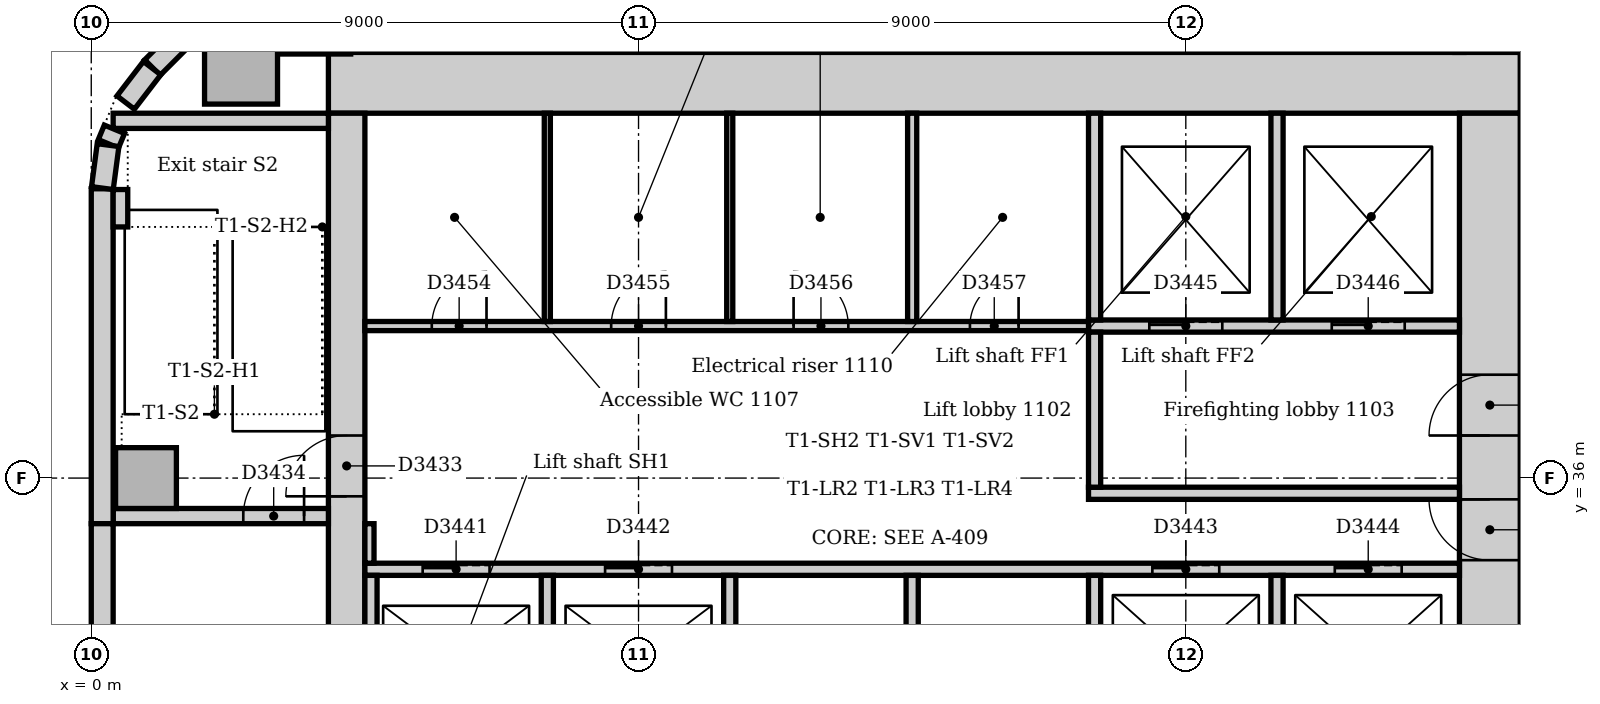
"""IFC4 building model, lengths in metres.
Left out: names, types, materials, properties, quantities, classifications, styles, units other than length and angle.
Written with IfcOpenShell. Run it as: python <this file> out.ifc"""

import sys

from ifc_helpers import new_model, si_unit, direction, frame, frame_2d, origin, origin_2d, place, context, subcontext, project, spatial, rectangle, extrude, element, fill, save


model = new_model("IFC4")
c1 = context("Model", 3, precision=1e-05, world=origin(), true_north=direction((0.0, 1.0)))
c2 = subcontext(c1, "Body", "Model", "MODEL_VIEW")
j1 = project(units=[si_unit("LENGTHUNIT", "METRE"), si_unit("PLANEANGLEUNIT", "RADIAN")], contexts=[c1])
p1 = place(None, origin())
s1 = spatial("IfcSite", under=j1, at=p1, CompositionType="ELEMENT")
p2 = place(p1, origin())
s2 = spatial("IfcBuilding", under=s1, at=p2, CompositionType="ELEMENT")
p3 = place(p2, frame((0.0, 0.0, 51.0)))
s3 = spatial("IfcBuildingStorey", under=s2, at=p3, CompositionType="ELEMENT", Elevation=51.0)
p4 = place(p3, frame((23.5, 42.5, 0.0), z_axis=(0.0, 0.0, 1.0), x_axis=(-1.0, 0.0, 0.0)))
e1 = element("IfcWall", 1, at=p4, inside=s3, PredefinedType="SOLIDWALL", context=c2, shape_type="SweptSolid", body=[
    extrude(rectangle(XDim=19.6, YDim=1.0, at=frame_2d((9.8, 0.0))), origin(), (0.0, 0.0, 1.0), 4.0),
])
p5 = place(p3, frame((23.0, 31.5, 0.0), z_axis=(0.0, 0.0, 1.0), x_axis=(0.0, 1.0, 0.0)))
e2 = element("IfcWall", 2, at=p5, inside=s3, PredefinedType="SOLIDWALL", context=c2, shape_type="SweptSolid", body=[
    extrude(rectangle(XDim=10.5, YDim=1.0, at=frame_2d((5.25, 0.0))), origin(), (0.0, 0.0, 1.0), 4.0),
])
p6 = place(p5, frame((3.15, 0.0, 0.0)))
e3 = element("IfcOpeningElement", 3, at=p6, cuts=e2, PredefinedType="OPENING", context=c2, shape_type="SweptSolid", body=[
    extrude(rectangle(XDim=1.0, YDim=2.1, at=frame_2d((0.5, 1.05))), frame((0.0, 0.51, 0.0), z_axis=(0.0, -1.0, 0.0), x_axis=(1.0, 0.0, 0.0)), (0.0, 0.0, 1.0), 1.02),
])
p7 = place(p5, frame((5.2, 0.0, 0.0)))
e4 = element("IfcOpeningElement", 4, at=p7, cuts=e2, PredefinedType="OPENING", context=c2, shape_type="SweptSolid", body=[
    extrude(rectangle(XDim=1.0, YDim=2.1, at=frame_2d((0.5, 1.05))), frame((0.0, 0.51, 0.0), z_axis=(0.0, -1.0, 0.0), x_axis=(1.0, 0.0, 0.0)), (0.0, 0.0, 1.0), 1.02),
])
p8 = place(p3, frame((4.2, 42.0, 0.0), z_axis=(0.0, 0.0, 1.0), x_axis=(0.0, -1.0, 0.0)))
e5 = element("IfcWall", 5, at=p8, inside=s3, PredefinedType="SOLIDWALL", context=c2, shape_type="SweptSolid", body=[
    extrude(rectangle(XDim=10.5, YDim=0.6, at=frame_2d((5.25, 0.0))), origin(), (0.0, 0.0, 1.0), 4.0),
])
p9 = place(p8, frame((5.3, 0.0, 0.0)))
e6 = element("IfcOpeningElement", 6, at=p9, cuts=e5, PredefinedType="OPENING", context=c2, shape_type="SweptSolid", body=[
    extrude(rectangle(XDim=1.0, YDim=2.1, at=frame_2d((0.5, 1.05))), frame((0.0, 0.31, 0.0), z_axis=(0.0, -1.0, 0.0), x_axis=(1.0, 0.0, 0.0)), (0.0, 0.0, 1.0), 0.62),
])
p10 = place(p3, frame((0.36, 35.375, 0.0), z_axis=(0.0, 0.0, 1.0), x_axis=(1.0, 0.0, 0.0)))
e7 = element("IfcWall", 7, at=p10, inside=s3, PredefinedType="SOLIDWALL", context=c2, shape_type="SweptSolid", body=[
    extrude(rectangle(XDim=3.54, YDim=0.25, at=frame_2d((1.77, 0.0))), origin(), (0.0, 0.0, 1.0), 4.0),
])
p11 = place(p10, frame((2.14, 0.0, 0.0)))
e8 = element("IfcOpeningElement", 8, at=p11, cuts=e7, PredefinedType="OPENING", context=c2, shape_type="SweptSolid", body=[
    extrude(rectangle(XDim=1.0, YDim=2.1, at=frame_2d((0.5, 1.05))), frame((0.0, 0.135, 0.0), z_axis=(0.0, -1.0, 0.0), x_axis=(1.0, 0.0, 0.0)), (0.0, 0.0, 1.0), 0.27),
])
p12 = place(p3, frame((3.9, 41.875, 0.0), z_axis=(0.0, 0.0, 1.0), x_axis=(-1.0, 0.0, 0.0)))
e9 = element("IfcWall", 9, at=p12, inside=s3, PredefinedType="SOLIDWALL", context=c2, shape_type="SweptSolid", body=[
    extrude(rectangle(XDim=3.54, YDim=0.25, at=frame_2d((1.77, 0.0))), origin(), (0.0, 0.0, 1.0), 4.0),
])
for number, where, z_axis, x_axis in (
    (10, (3.667, 43.574, 0.0), (0.0, 0.0, 1.0), (1.0, 0.0, 0.0)),
    (11, (2.463, 42.75, 0.0), (0.0, 0.0, 1.0), (1.0, 0.0, 0.0)),
):
    element("IfcColumn", number, at=place(p3, frame(where, z_axis=z_axis, x_axis=x_axis)), inside=s3, PredefinedType="COLUMN", context=c2, shape_type="SweptSolid", body=[
        extrude(rectangle(XDim=1.2, YDim=1.2, at=origin_2d()), origin(), (0.0, 0.0, 1.0), 3.85),
    ])
p13 = place(p3, frame((0.9, 36.0, 0.0), z_axis=(0.0, 0.0, 1.0), x_axis=(1.0, 0.0, 0.0)))
e12 = element("IfcColumn", 12, at=p13, inside=s3, PredefinedType="COLUMN", context=c2, shape_type="SweptSolid", body=[
    extrude(rectangle(XDim=1.0, YDim=1.0, at=origin_2d()), origin(), (0.0, 0.0, 1.0), 4.0),
])
p14 = place(p3, frame((2.249, 43.994, 0.0), z_axis=(0.0, 0.0, 1.0), x_axis=(-0.707106781187, -0.707106781187, 0.0)))
e13 = element("IfcWall", 13, at=p14, inside=s3, PredefinedType="STANDARD", context=c2, shape_type="SweptSolid", body=[
    extrude(rectangle(XDim=1.757, YDim=0.36, at=frame_2d((0.879, 0.0))), origin(), (0.0, 0.0, 1.0), 3.85),
])
p15 = place(p3, frame((0.18, 40.757, 0.0), z_axis=(0.0, 0.0, 1.0), x_axis=(0.0, -1.0, 0.0)))
e14 = element("IfcWall", 14, at=p15, inside=s3, PredefinedType="STANDARD", context=c2, shape_type="SweptSolid", body=[
    extrude(rectangle(XDim=5.507, YDim=0.36, at=frame_2d((2.754, 0.0))), origin(), (0.0, 0.0, 1.0), 3.85),
])
p16 = place(p3, frame((0.18, 35.25, 0.0), z_axis=(0.0, 0.0, 1.0), x_axis=(0.0, -1.0, 0.0)))
e15 = element("IfcWall", 15, at=p16, inside=s3, PredefinedType="STANDARD", context=c2, shape_type="SweptSolid", body=[
    extrude(rectangle(XDim=7.5, YDim=0.36, at=frame_2d((3.75, 0.0))), origin(), (0.0, 0.0, 1.0), 3.85),
])
p17 = place(p3, frame((1.0, 42.741, 0.0), z_axis=(0.0, 0.0, 1.0), x_axis=(-0.608802368033, -0.793321924995, 0.0)))
e16 = element("IfcWall", 16, at=p17, inside=s3, PredefinedType="STANDARD", context=c2, shape_type="SweptSolid", body=[
    extrude(rectangle(XDim=0.713, YDim=0.36, at=frame_2d((0.357, 0.0))), origin(), (0.0, 0.0, 1.0), 3.85),
])
p18 = place(p3, frame((0.381, 41.736, 0.0), z_axis=(0.0, 0.0, 1.0), x_axis=(-0.382773360986, -0.923842277729, 0.0)))
e17 = element("IfcWall", 17, at=p18, inside=s3, PredefinedType="STANDARD", context=c2, shape_type="SweptSolid", body=[
    extrude(rectangle(XDim=0.258, YDim=0.36, at=frame_2d((0.129, 0.0))), origin(), (0.0, 0.0, 1.0), 3.85),
])
p19 = place(p3, frame((0.276, 41.476, 0.0), z_axis=(0.0, 0.0, 1.0), x_axis=(-0.13055608231, -0.99144092581, 0.0)))
e18 = element("IfcWall", 18, at=p19, inside=s3, PredefinedType="STANDARD", context=c2, shape_type="SweptSolid", body=[
    extrude(rectangle(XDim=0.713, YDim=0.36, at=frame_2d((0.356, 0.0))), origin(), (0.0, 0.0, 1.0), 3.85),
])
p20 = place(p3, frame((0.48, 40.13, 0.0), z_axis=(0.0, 0.0, 1.0), x_axis=(0.0, 1.0, 0.0)))
e19 = element("IfcWall", 19, at=p20, inside=s3, PredefinedType="STANDARD", context=c2, shape_type="SweptSolid", body=[
    extrude(rectangle(XDim=0.615, YDim=0.24, at=frame_2d((0.307, 0.0))), origin(), (0.0, 0.0, 1.0), 4.0),
])
p21 = place(p3, frame((16.4, 35.75, 0.0), z_axis=(0.0, 0.0, 1.0), x_axis=(1.0, 0.0, 0.0)))
e20 = element("IfcWall", 20, at=p21, inside=s3, PredefinedType="PARTITIONING", context=c2, shape_type="SweptSolid", body=[
    extrude(rectangle(XDim=6.1, YDim=0.2, at=frame_2d((3.05, 0.0))), origin(), (0.0, 0.0, 1.0), 3.85),
])
p22 = place(p3, frame((16.4, 38.5, 0.0), z_axis=(0.0, 0.0, 1.0), x_axis=(1.0, 0.0, 0.0)))
e21 = element("IfcWall", 21, at=p22, inside=s3, PredefinedType="PARTITIONING", context=c2, shape_type="SweptSolid", body=[
    extrude(rectangle(XDim=6.1, YDim=0.2, at=frame_2d((3.05, 0.0))), origin(), (0.0, 0.0, 1.0), 3.85),
])
p23 = place(p22, frame((1.0, 0.0, 0.0)))
e22 = element("IfcOpeningElement", 22, at=p23, cuts=e21, PredefinedType="OPENING", context=c2, shape_type="SweptSolid", body=[
    extrude(rectangle(XDim=1.2, YDim=2.1, at=frame_2d((0.6, 1.05))), frame((0.0, 0.11, 0.0), z_axis=(0.0, -1.0, 0.0), x_axis=(1.0, 0.0, 0.0)), (0.0, 0.0, 1.0), 0.22),
])
p24 = place(p22, frame((4.0, 0.0, 0.0)))
e23 = element("IfcOpeningElement", 23, at=p24, cuts=e21, PredefinedType="OPENING", context=c2, shape_type="SweptSolid", body=[
    extrude(rectangle(XDim=1.2, YDim=2.1, at=frame_2d((0.6, 1.05))), frame((0.0, 0.11, 0.0), z_axis=(0.0, -1.0, 0.0), x_axis=(1.0, 0.0, 0.0)), (0.0, 0.0, 1.0), 0.22),
])
p25 = place(p3, frame((16.5, 35.85, 0.0), z_axis=(0.0, 0.0, 1.0), x_axis=(0.0, 1.0, 0.0)))
e24 = element("IfcWall", 24, at=p25, inside=s3, PredefinedType="PARTITIONING", context=c2, shape_type="SweptSolid", body=[
    extrude(rectangle(XDim=2.55, YDim=0.2, at=frame_2d((1.275, 0.0))), origin(), (0.0, 0.0, 1.0), 3.85),
])
p26 = place(p3, frame((4.5, 34.5, 0.0), z_axis=(0.0, 0.0, 1.0), x_axis=(1.0, 0.0, 0.0)))
e25 = element("IfcWall", 25, at=p26, inside=s3, PredefinedType="PARTITIONING", context=c2, shape_type="SweptSolid", body=[
    extrude(rectangle(XDim=18.0, YDim=0.2, at=frame_2d((9.0, 0.0))), origin(), (0.0, 0.0, 1.0), 3.85),
])
p27 = place(p26, frame((0.95, 0.0, 0.0)))
e26 = element("IfcOpeningElement", 26, at=p27, cuts=e25, PredefinedType="OPENING", context=c2, shape_type="SweptSolid", body=[
    extrude(rectangle(XDim=1.1, YDim=2.1, at=frame_2d((0.55, 1.05))), frame((0.0, 0.11, 0.0), z_axis=(0.0, -1.0, 0.0), x_axis=(1.0, 0.0, 0.0)), (0.0, 0.0, 1.0), 0.22),
])
p28 = place(p26, frame((3.95, 0.0, 0.0)))
e27 = element("IfcOpeningElement", 27, at=p28, cuts=e25, PredefinedType="OPENING", context=c2, shape_type="SweptSolid", body=[
    extrude(rectangle(XDim=1.1, YDim=2.1, at=frame_2d((0.55, 1.05))), frame((0.0, 0.11, 0.0), z_axis=(0.0, -1.0, 0.0), x_axis=(1.0, 0.0, 0.0)), (0.0, 0.0, 1.0), 0.22),
])
p29 = place(p26, frame((12.95, 0.0, 0.0)))
e28 = element("IfcOpeningElement", 28, at=p29, cuts=e25, PredefinedType="OPENING", context=c2, shape_type="SweptSolid", body=[
    extrude(rectangle(XDim=1.1, YDim=2.1, at=frame_2d((0.55, 1.05))), frame((0.0, 0.11, 0.0), z_axis=(0.0, -1.0, 0.0), x_axis=(1.0, 0.0, 0.0)), (0.0, 0.0, 1.0), 0.22),
])
p30 = place(p26, frame((15.95, 0.0, 0.0)))
e29 = element("IfcOpeningElement", 29, at=p30, cuts=e25, PredefinedType="OPENING", context=c2, shape_type="SweptSolid", body=[
    extrude(rectangle(XDim=1.1, YDim=2.1, at=frame_2d((0.55, 1.05))), frame((0.0, 0.11, 0.0), z_axis=(0.0, -1.0, 0.0), x_axis=(1.0, 0.0, 0.0)), (0.0, 0.0, 1.0), 0.22),
])
for number, where, z_axis, x_axis in (
    (30, (16.5, 38.6, 0.0), (0.0, 0.0, 1.0), (0.0, 1.0, 0.0)),
    (31, (19.5, 38.6, 0.0), (0.0, 0.0, 1.0), (0.0, 1.0, 0.0)),
):
    element("IfcWall", number, at=place(p3, frame(where, z_axis=z_axis, x_axis=x_axis)), inside=s3, PredefinedType="PARTITIONING", context=c2, shape_type="SweptSolid", body=[
        extrude(rectangle(XDim=3.4, YDim=0.2, at=frame_2d((1.7, 0.0))), origin(), (0.0, 0.0, 1.0), 3.85),
    ])
for number, where, z_axis, x_axis in (
    (32, (4.6, 31.75, 0.0), (0.0, 0.0, 1.0), (0.0, 1.0, 0.0)),
    (33, (7.5, 31.75, 0.0), (0.0, 0.0, 1.0), (0.0, 1.0, 0.0)),
    (34, (10.5, 31.75, 0.0), (0.0, 0.0, 1.0), (0.0, 1.0, 0.0)),
    (35, (13.5, 31.75, 0.0), (0.0, 0.0, 1.0), (0.0, 1.0, 0.0)),
    (36, (16.5, 31.75, 0.0), (0.0, 0.0, 1.0), (0.0, 1.0, 0.0)),
    (37, (19.5, 31.75, 0.0), (0.0, 0.0, 1.0), (0.0, 1.0, 0.0)),
):
    element("IfcWall", number, at=place(p3, frame(where, z_axis=z_axis, x_axis=x_axis)), inside=s3, PredefinedType="PARTITIONING", context=c2, shape_type="SweptSolid", body=[
        extrude(rectangle(XDim=2.65, YDim=0.2, at=frame_2d((1.325, 0.0))), origin(), (0.0, 0.0, 1.0), 3.85),
    ])
p31 = place(p3, frame((4.5, 38.5, 0.0), z_axis=(0.0, 0.0, 1.0), x_axis=(1.0, 0.0, 0.0)))
e38 = element("IfcWall", 38, at=p31, inside=s3, PredefinedType="PARTITIONING", context=c2, shape_type="SweptSolid", body=[
    extrude(rectangle(XDim=11.9, YDim=0.15, at=frame_2d((5.95, 0.0))), origin(), (0.0, 0.0, 1.0), 3.85),
])
p32 = place(p31, frame((1.1, 0.0, 0.0)))
e39 = element("IfcOpeningElement", 39, at=p32, cuts=e38, PredefinedType="OPENING", context=c2, shape_type="SweptSolid", body=[
    extrude(rectangle(XDim=0.9, YDim=2.1, at=frame_2d((0.45, 1.05))), frame((0.0, 0.085, 0.0), z_axis=(0.0, -1.0, 0.0), x_axis=(1.0, 0.0, 0.0)), (0.0, 0.0, 1.0), 0.17),
])
p33 = place(p31, frame((4.05, 0.0, 0.0)))
e40 = element("IfcOpeningElement", 40, at=p33, cuts=e38, PredefinedType="OPENING", context=c2, shape_type="SweptSolid", body=[
    extrude(rectangle(XDim=0.9, YDim=2.1, at=frame_2d((0.45, 1.05))), frame((0.0, 0.085, 0.0), z_axis=(0.0, -1.0, 0.0), x_axis=(1.0, 0.0, 0.0)), (0.0, 0.0, 1.0), 0.17),
])
p34 = place(p31, frame((7.05, 0.0, 0.0)))
e41 = element("IfcOpeningElement", 41, at=p34, cuts=e38, PredefinedType="OPENING", context=c2, shape_type="SweptSolid", body=[
    extrude(rectangle(XDim=0.9, YDim=2.1, at=frame_2d((0.45, 1.05))), frame((0.0, 0.085, 0.0), z_axis=(0.0, -1.0, 0.0), x_axis=(1.0, 0.0, 0.0)), (0.0, 0.0, 1.0), 0.17),
])
p35 = place(p31, frame((9.95, 0.0, 0.0)))
e42 = element("IfcOpeningElement", 42, at=p35, cuts=e38, PredefinedType="OPENING", context=c2, shape_type="SweptSolid", body=[
    extrude(rectangle(XDim=0.8, YDim=2.1, at=frame_2d((0.4, 1.05))), frame((0.0, 0.085, 0.0), z_axis=(0.0, -1.0, 0.0), x_axis=(1.0, 0.0, 0.0)), (0.0, 0.0, 1.0), 0.17),
])
p36 = place(p3, frame((4.575, 34.6, 0.0), z_axis=(0.0, 0.0, 1.0), x_axis=(0.0, 1.0, 0.0)))
e43 = element("IfcWall", 43, at=p36, inside=s3, PredefinedType="PARTITIONING", context=c2, shape_type="SweptSolid", body=[
    extrude(rectangle(XDim=0.65, YDim=0.15, at=frame_2d((0.325, 0.0))), origin(), (0.0, 0.0, 1.0), 3.85),
])
p37 = place(p3, frame((13.5, 38.575, 0.0), z_axis=(0.0, 0.0, 1.0), x_axis=(0.0, 1.0, 0.0)))
e44 = element("IfcWall", 44, at=p37, inside=s3, PredefinedType="PARTITIONING", context=c2, shape_type="SweptSolid", body=[
    extrude(rectangle(XDim=3.425, YDim=0.15, at=frame_2d((1.712, 0.0))), origin(), (0.0, 0.0, 1.0), 3.85),
])
for number, where, z_axis, x_axis in (
    (45, (7.5, 38.575, 0.0), (0.0, 0.0, 1.0), (0.0, 1.0, 0.0)),
    (46, (10.5, 38.575, 0.0), (0.0, 0.0, 1.0), (0.0, 1.0, 0.0)),
):
    element("IfcWall", number, at=place(p3, frame(where, z_axis=z_axis, x_axis=x_axis)), inside=s3, PredefinedType="PARTITIONING", context=c2, shape_type="SweptSolid", body=[
        extrude(rectangle(XDim=3.425, YDim=0.1, at=frame_2d((1.712, 0.0))), origin(), (0.0, 0.0, 1.0), 3.85),
    ])
p38 = place(p9, frame((1.0, 0.0, 0.0), z_axis=(0.0, 0.0, 1.0), x_axis=(-1.0, 0.0, 0.0)))
e47 = element("IfcDoor", 47, at=p38, inside=s3, OperationType="SINGLE_SWING_LEFT", PredefinedType="DOOR", context=c2, shape_type="SweptSolid", body=[
    extrude(rectangle(XDim=1.0, YDim=2.1, at=frame_2d((0.5, 1.05))), frame((0.0, 0.025, 0.0), z_axis=(0.0, -1.0, 0.0), x_axis=(1.0, 0.0, 0.0)), (0.0, 0.0, 1.0), 0.05),
])
fill(e6, e47)
p39 = place(p11, origin())
e48 = element("IfcDoor", 48, at=p39, inside=s3, OperationType="SINGLE_SWING_RIGHT", PredefinedType="DOOR", context=c2, shape_type="SweptSolid", body=[
    extrude(rectangle(XDim=1.0, YDim=2.1, at=frame_2d((0.5, 1.05))), frame((0.0, 0.025, 0.0), z_axis=(0.0, -1.0, 0.0), x_axis=(1.0, 0.0, 0.0)), (0.0, 0.0, 1.0), 0.05),
])
fill(e8, e48)
p40 = place(p27, origin())
e49 = element("IfcDoor", 49, at=p40, inside=s3, OperationType="SLIDING_TO_LEFT", PredefinedType="DOOR", context=c2, shape_type="SweptSolid", body=[
    extrude(rectangle(XDim=1.1, YDim=2.1, at=frame_2d((0.55, 1.05))), frame((0.0, 0.025, 0.0), z_axis=(0.0, -1.0, 0.0), x_axis=(1.0, 0.0, 0.0)), (0.0, 0.0, 1.0), 0.05),
])
fill(e26, e49)
p41 = place(p28, origin())
e50 = element("IfcDoor", 50, at=p41, inside=s3, OperationType="SLIDING_TO_LEFT", PredefinedType="DOOR", context=c2, shape_type="SweptSolid", body=[
    extrude(rectangle(XDim=1.1, YDim=2.1, at=frame_2d((0.55, 1.05))), frame((0.0, 0.025, 0.0), z_axis=(0.0, -1.0, 0.0), x_axis=(1.0, 0.0, 0.0)), (0.0, 0.0, 1.0), 0.05),
])
fill(e27, e50)
p42 = place(p29, origin())
e51 = element("IfcDoor", 51, at=p42, inside=s3, OperationType="SLIDING_TO_LEFT", PredefinedType="DOOR", context=c2, shape_type="SweptSolid", body=[
    extrude(rectangle(XDim=1.1, YDim=2.1, at=frame_2d((0.55, 1.05))), frame((0.0, 0.025, 0.0), z_axis=(0.0, -1.0, 0.0), x_axis=(1.0, 0.0, 0.0)), (0.0, 0.0, 1.0), 0.05),
])
fill(e28, e51)
p43 = place(p30, origin())
e52 = element("IfcDoor", 52, at=p43, inside=s3, OperationType="SLIDING_TO_LEFT", PredefinedType="DOOR", context=c2, shape_type="SweptSolid", body=[
    extrude(rectangle(XDim=1.1, YDim=2.1, at=frame_2d((0.55, 1.05))), frame((0.0, 0.025, 0.0), z_axis=(0.0, -1.0, 0.0), x_axis=(1.0, 0.0, 0.0)), (0.0, 0.0, 1.0), 0.05),
])
fill(e29, e52)
p44 = place(p23, origin())
e53 = element("IfcDoor", 53, at=p44, inside=s3, OperationType="SLIDING_TO_LEFT", PredefinedType="DOOR", context=c2, shape_type="SweptSolid", body=[
    extrude(rectangle(XDim=1.2, YDim=2.1, at=frame_2d((0.6, 1.05))), frame((0.0, 0.025, 0.0), z_axis=(0.0, -1.0, 0.0), x_axis=(1.0, 0.0, 0.0)), (0.0, 0.0, 1.0), 0.05),
])
fill(e22, e53)
p45 = place(p24, origin())
e54 = element("IfcDoor", 54, at=p45, inside=s3, OperationType="SLIDING_TO_LEFT", PredefinedType="DOOR", context=c2, shape_type="SweptSolid", body=[
    extrude(rectangle(XDim=1.2, YDim=2.1, at=frame_2d((0.6, 1.05))), frame((0.0, 0.025, 0.0), z_axis=(0.0, -1.0, 0.0), x_axis=(1.0, 0.0, 0.0)), (0.0, 0.0, 1.0), 0.05),
])
fill(e23, e54)
p46 = place(p6, origin())
e55 = element("IfcDoor", 55, at=p46, inside=s3, OperationType="SINGLE_SWING_RIGHT", PredefinedType="DOOR", context=c2, shape_type="SweptSolid", body=[
    extrude(rectangle(XDim=1.0, YDim=2.1, at=frame_2d((0.5, 1.05))), frame((0.0, 0.025, 0.0), z_axis=(0.0, -1.0, 0.0), x_axis=(1.0, 0.0, 0.0)), (0.0, 0.0, 1.0), 0.05),
])
fill(e3, e55)
p47 = place(p7, origin())
e56 = element("IfcDoor", 56, at=p47, inside=s3, OperationType="SINGLE_SWING_LEFT", PredefinedType="DOOR", context=c2, shape_type="SweptSolid", body=[
    extrude(rectangle(XDim=1.0, YDim=2.1, at=frame_2d((0.5, 1.05))), frame((0.0, 0.025, 0.0), z_axis=(0.0, -1.0, 0.0), x_axis=(1.0, 0.0, 0.0)), (0.0, 0.0, 1.0), 0.05),
])
fill(e4, e56)
p48 = place(p32, origin())
e57 = element("IfcDoor", 57, at=p48, inside=s3, OperationType="SINGLE_SWING_RIGHT", PredefinedType="DOOR", context=c2, shape_type="SweptSolid", body=[
    extrude(rectangle(XDim=0.9, YDim=2.1, at=frame_2d((0.45, 1.05))), frame((0.0, 0.025, 0.0), z_axis=(0.0, -1.0, 0.0), x_axis=(1.0, 0.0, 0.0)), (0.0, 0.0, 1.0), 0.05),
])
fill(e39, e57)
p49 = place(p33, origin())
e58 = element("IfcDoor", 58, at=p49, inside=s3, OperationType="SINGLE_SWING_RIGHT", PredefinedType="DOOR", context=c2, shape_type="SweptSolid", body=[
    extrude(rectangle(XDim=0.9, YDim=2.1, at=frame_2d((0.45, 1.05))), frame((0.0, 0.025, 0.0), z_axis=(0.0, -1.0, 0.0), x_axis=(1.0, 0.0, 0.0)), (0.0, 0.0, 1.0), 0.05),
])
fill(e40, e58)
p50 = place(p34, origin())
e59 = element("IfcDoor", 59, at=p50, inside=s3, OperationType="SINGLE_SWING_LEFT", PredefinedType="DOOR", context=c2, shape_type="SweptSolid", body=[
    extrude(rectangle(XDim=0.9, YDim=2.1, at=frame_2d((0.45, 1.05))), frame((0.0, 0.025, 0.0), z_axis=(0.0, -1.0, 0.0), x_axis=(1.0, 0.0, 0.0)), (0.0, 0.0, 1.0), 0.05),
])
fill(e41, e59)
p51 = place(p35, origin())
e60 = element("IfcDoor", 60, at=p51, inside=s3, OperationType="SINGLE_SWING_RIGHT", PredefinedType="DOOR", context=c2, shape_type="SweptSolid", body=[
    extrude(rectangle(XDim=0.8, YDim=2.1, at=frame_2d((0.4, 1.05))), frame((0.0, 0.025, 0.0), z_axis=(0.0, -1.0, 0.0), x_axis=(1.0, 0.0, 0.0)), (0.0, 0.0, 1.0), 0.05),
])
fill(e42, e60)
save(model, sys.argv[1])
